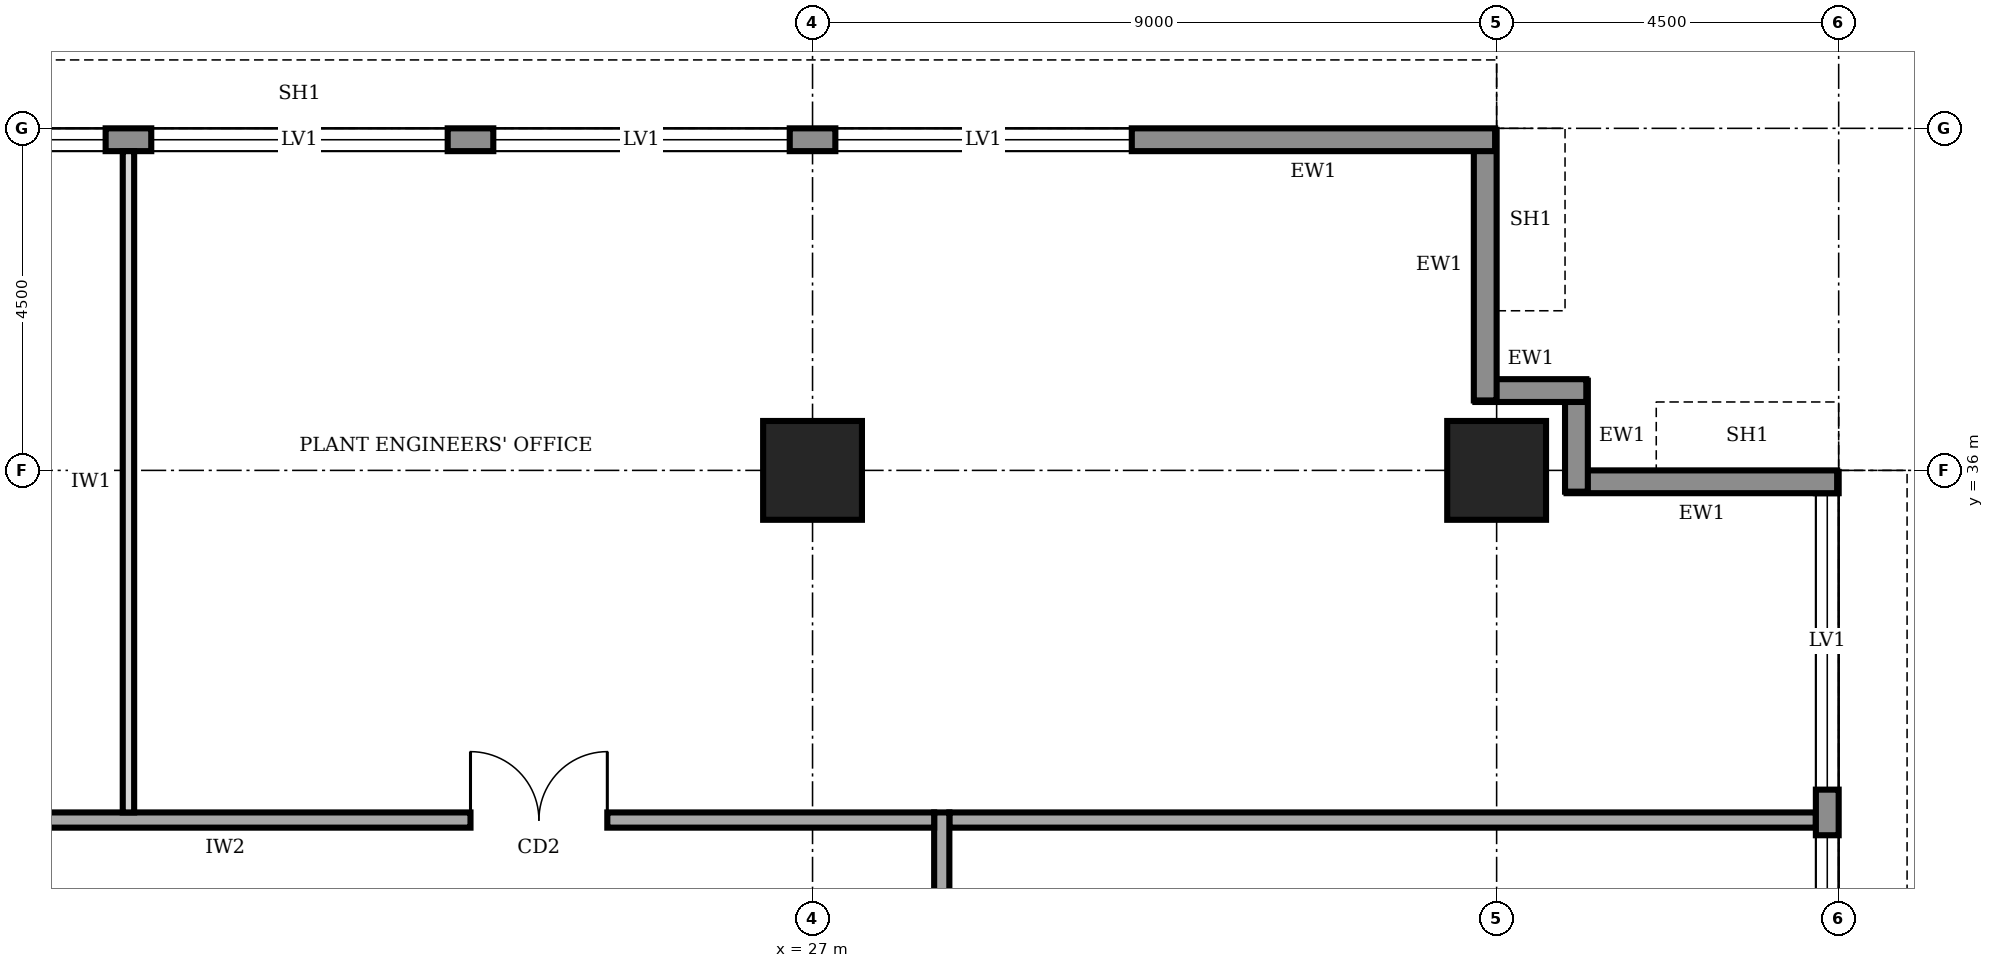
"""IFC4 building model, lengths in metres.
Left out: names, types, materials, properties, quantities, classifications, styles, units other than length and angle.
Written with IfcOpenShell. Run it as: python <this file> out.ifc"""

import sys

from ifc_helpers import new_model, si_unit, direction, frame, frame_2d, origin, origin_2d, place, context, subcontext, project, spatial, rectangle, extrude, element, fill, save


model = new_model("IFC4")
c1 = context("Model", 3, precision=1e-05, world=origin(), true_north=direction((0.0, 1.0)))
c2 = subcontext(c1, "Body", "Model", "MODEL_VIEW")
j1 = project(units=[si_unit("LENGTHUNIT", "METRE"), si_unit("PLANEANGLEUNIT", "RADIAN")], contexts=[c1])
p1 = place(None, origin())
s1 = spatial("IfcSite", under=j1, at=p1, CompositionType="ELEMENT")
p2 = place(p1, origin())
s2 = spatial("IfcBuilding", under=s1, at=p2, CompositionType="ELEMENT")
p3 = place(p2, frame((0.0, 0.0, 289.0)))
s3 = spatial("IfcBuildingStorey", under=s2, at=p3, CompositionType="ELEMENT", Elevation=289.0)
for number, where, z_axis, x_axis in (
    (1, (27.0, 36.0, 0.0), (0.0, 0.0, 1.0), (1.0, 0.0, 0.0)),
    (2, (36.0, 36.0, 0.0), (0.0, 0.0, 1.0), (1.0, 0.0, 0.0)),
):
    element("IfcColumn", number, at=place(p3, frame(where, z_axis=z_axis, x_axis=x_axis)), inside=s3, PredefinedType="COLUMN", context=c2, shape_type="SweptSolid", body=[
        extrude(rectangle(XDim=1.3, YDim=1.3, at=origin_2d()), origin(), (0.0, 0.0, 1.0), 4.0),
    ])
p4 = place(p3, frame((40.35, 4.52, 0.0), z_axis=(0.0, 0.0, 1.0), x_axis=(0.0, 1.0, 0.0)))
e3 = element("IfcWall", 3, at=p4, inside=s3, PredefinedType="STANDARD", context=c2, shape_type="SweptSolid", body=[
    extrude(rectangle(XDim=31.46, YDim=0.3, at=frame_2d((15.73, 0.0))), origin(), (0.0, 0.0, 1.0), 3.75),
])
p5 = place(p4, frame((4.78, 0.0, 0.9)))
e4 = element("IfcOpeningElement", 4, at=p5, cuts=e3, PredefinedType="OPENING", context=c2, shape_type="SweptSolid", body=[
    extrude(rectangle(XDim=3.9, YDim=2.2, at=frame_2d((1.95, 1.1))), frame((0.0, 0.16, 0.0), z_axis=(0.0, -1.0, 0.0), x_axis=(1.0, 0.0, 0.0)), (0.0, 0.0, 1.0), 0.32),
])
p6 = place(p4, frame((9.28, 0.0, 0.9)))
e5 = element("IfcOpeningElement", 5, at=p6, cuts=e3, PredefinedType="OPENING", context=c2, shape_type="SweptSolid", body=[
    extrude(rectangle(XDim=3.9, YDim=2.2, at=frame_2d((1.95, 1.1))), frame((0.0, 0.16, 0.0), z_axis=(0.0, -1.0, 0.0), x_axis=(1.0, 0.0, 0.0)), (0.0, 0.0, 1.0), 0.32),
])
p7 = place(p4, frame((13.78, 0.0, 0.9)))
e6 = element("IfcOpeningElement", 6, at=p7, cuts=e3, PredefinedType="OPENING", context=c2, shape_type="SweptSolid", body=[
    extrude(rectangle(XDim=3.9, YDim=2.2, at=frame_2d((1.95, 1.1))), frame((0.0, 0.16, 0.0), z_axis=(0.0, -1.0, 0.0), x_axis=(1.0, 0.0, 0.0)), (0.0, 0.0, 1.0), 0.32),
])
p8 = place(p4, frame((18.28, 0.0, 0.9)))
e7 = element("IfcOpeningElement", 7, at=p8, cuts=e3, PredefinedType="OPENING", context=c2, shape_type="SweptSolid", body=[
    extrude(rectangle(XDim=3.9, YDim=2.2, at=frame_2d((1.95, 1.1))), frame((0.0, 0.16, 0.0), z_axis=(0.0, -1.0, 0.0), x_axis=(1.0, 0.0, 0.0)), (0.0, 0.0, 1.0), 0.32),
])
p9 = place(p4, frame((22.78, 0.0, 0.9)))
e8 = element("IfcOpeningElement", 8, at=p9, cuts=e3, PredefinedType="OPENING", context=c2, shape_type="SweptSolid", body=[
    extrude(rectangle(XDim=3.9, YDim=2.2, at=frame_2d((1.95, 1.1))), frame((0.0, 0.16, 0.0), z_axis=(0.0, -1.0, 0.0), x_axis=(1.0, 0.0, 0.0)), (0.0, 0.0, 1.0), 0.32),
])
p10 = place(p4, frame((27.28, 0.0, 0.9)))
e9 = element("IfcOpeningElement", 9, at=p10, cuts=e3, PredefinedType="OPENING", context=c2, shape_type="SweptSolid", body=[
    extrude(rectangle(XDim=3.9, YDim=2.2, at=frame_2d((1.95, 1.1))), frame((0.0, 0.16, 0.0), z_axis=(0.0, -1.0, 0.0), x_axis=(1.0, 0.0, 0.0)), (0.0, 0.0, 1.0), 0.32),
])
p11 = place(p3, frame((40.48, 35.85, 0.0), z_axis=(0.0, 0.0, 1.0), x_axis=(-1.0, 0.0, 0.0)))
e10 = element("IfcWall", 10, at=p11, inside=s3, PredefinedType="STANDARD", context=c2, shape_type="SweptSolid", body=[
    extrude(rectangle(XDim=3.56, YDim=0.3, at=frame_2d((1.78, 0.0))), origin(), (0.0, 0.0, 1.0), 2.85),
])
for number, where, z_axis, x_axis in (
    (11, (37.05, 35.72, 0.0), (0.0, 0.0, 1.0), (0.0, 1.0, 0.0)),
    (12, (37.18, 37.05, 0.0), (0.0, 0.0, 1.0), (-1.0, 0.0, 0.0)),
):
    element("IfcWall", number, at=place(p3, frame(where, z_axis=z_axis, x_axis=x_axis)), inside=s3, PredefinedType="STANDARD", context=c2, shape_type="SweptSolid", body=[
        extrude(rectangle(XDim=1.46, YDim=0.3, at=frame_2d((0.73, 0.0))), origin(), (0.0, 0.0, 1.0), 3.75),
    ])
p12 = place(p3, frame((35.85, 36.92, 0.0), z_axis=(0.0, 0.0, 1.0), x_axis=(0.0, 1.0, 0.0)))
e13 = element("IfcWall", 13, at=p12, inside=s3, PredefinedType="STANDARD", context=c2, shape_type="SweptSolid", body=[
    extrude(rectangle(XDim=3.56, YDim=0.3, at=frame_2d((1.78, 0.0))), origin(), (0.0, 0.0, 1.0), 2.85),
])
p13 = place(p3, frame((35.98, 40.35, 0.0), z_axis=(0.0, 0.0, 1.0), x_axis=(-1.0, 0.0, 0.0)))
e14 = element("IfcWall", 14, at=p13, inside=s3, PredefinedType="STANDARD", context=c2, shape_type="SweptSolid", body=[
    extrude(rectangle(XDim=31.46, YDim=0.3, at=frame_2d((15.73, 0.0))), origin(), (0.0, 0.0, 1.0), 3.75),
])
p14 = place(p13, frame((27.28, 0.0, 0.9)))
e15 = element("IfcOpeningElement", 15, at=p14, cuts=e14, PredefinedType="OPENING", context=c2, shape_type="SweptSolid", body=[
    extrude(rectangle(XDim=3.9, YDim=2.2, at=frame_2d((1.95, 1.1))), frame((0.0, 0.16, 0.0), z_axis=(0.0, -1.0, 0.0), x_axis=(1.0, 0.0, 0.0)), (0.0, 0.0, 1.0), 0.32),
])
p15 = place(p13, frame((22.78, 0.0, 0.9)))
e16 = element("IfcOpeningElement", 16, at=p15, cuts=e14, PredefinedType="OPENING", context=c2, shape_type="SweptSolid", body=[
    extrude(rectangle(XDim=3.9, YDim=2.2, at=frame_2d((1.95, 1.1))), frame((0.0, 0.16, 0.0), z_axis=(0.0, -1.0, 0.0), x_axis=(1.0, 0.0, 0.0)), (0.0, 0.0, 1.0), 0.32),
])
p16 = place(p13, frame((18.28, 0.0, 0.9)))
e17 = element("IfcOpeningElement", 17, at=p16, cuts=e14, PredefinedType="OPENING", context=c2, shape_type="SweptSolid", body=[
    extrude(rectangle(XDim=3.9, YDim=2.2, at=frame_2d((1.95, 1.1))), frame((0.0, 0.16, 0.0), z_axis=(0.0, -1.0, 0.0), x_axis=(1.0, 0.0, 0.0)), (0.0, 0.0, 1.0), 0.32),
])
p17 = place(p13, frame((13.78, 0.0, 0.9)))
e18 = element("IfcOpeningElement", 18, at=p17, cuts=e14, PredefinedType="OPENING", context=c2, shape_type="SweptSolid", body=[
    extrude(rectangle(XDim=3.9, YDim=2.2, at=frame_2d((1.95, 1.1))), frame((0.0, 0.16, 0.0), z_axis=(0.0, -1.0, 0.0), x_axis=(1.0, 0.0, 0.0)), (0.0, 0.0, 1.0), 0.32),
])
p18 = place(p13, frame((9.28, 0.0, 0.9)))
e19 = element("IfcOpeningElement", 19, at=p18, cuts=e14, PredefinedType="OPENING", context=c2, shape_type="SweptSolid", body=[
    extrude(rectangle(XDim=3.9, YDim=2.2, at=frame_2d((1.95, 1.1))), frame((0.0, 0.16, 0.0), z_axis=(0.0, -1.0, 0.0), x_axis=(1.0, 0.0, 0.0)), (0.0, 0.0, 1.0), 0.32),
])
p19 = place(p13, frame((4.78, 0.0, 0.9)))
e20 = element("IfcOpeningElement", 20, at=p19, cuts=e14, PredefinedType="OPENING", context=c2, shape_type="SweptSolid", body=[
    extrude(rectangle(XDim=3.9, YDim=2.2, at=frame_2d((1.95, 1.1))), frame((0.0, 0.16, 0.0), z_axis=(0.0, -1.0, 0.0), x_axis=(1.0, 0.0, 0.0)), (0.0, 0.0, 1.0), 0.32),
])
p20 = place(p3, frame((28.7, 9.2, 0.0), z_axis=(0.0, 0.0, 1.0), x_axis=(0.0, 1.0, 0.0)))
e21 = element("IfcWall", 21, at=p20, inside=s3, PredefinedType="SOLIDWALL", context=c2, shape_type="SweptSolid", body=[
    extrude(rectangle(XDim=22.3, YDim=0.2, at=frame_2d((11.15, 0.0))), origin(), (0.0, 0.0, 1.0), 3.75),
])
p21 = place(p20, frame((10.05, 0.0, 0.0)))
e22 = element("IfcOpeningElement", 22, at=p21, cuts=e21, PredefinedType="OPENING", context=c2, shape_type="SweptSolid", body=[
    extrude(rectangle(XDim=2.0, YDim=2.1, at=frame_2d((1.0, 1.05))), frame((0.0, 0.11, 0.0), z_axis=(0.0, -1.0, 0.0), x_axis=(1.0, 0.0, 0.0)), (0.0, 0.0, 1.0), 0.22),
])
p22 = place(p3, frame((28.6, 31.4, 0.0), z_axis=(0.0, 0.0, 1.0), x_axis=(-1.0, 0.0, 0.0)))
e23 = element("IfcWall", 23, at=p22, inside=s3, PredefinedType="SOLIDWALL", context=c2, shape_type="SweptSolid", body=[
    extrude(rectangle(XDim=16.9, YDim=0.2, at=frame_2d((8.45, 0.0))), origin(), (0.0, 0.0, 1.0), 3.75),
])
p23 = place(p22, frame((12.55, 0.0, 0.0)))
e24 = element("IfcOpeningElement", 24, at=p23, cuts=e23, PredefinedType="OPENING", context=c2, shape_type="SweptSolid", body=[
    extrude(rectangle(XDim=2.4, YDim=2.7, at=frame_2d((1.2, 1.35))), frame((0.0, 0.11, 0.0), z_axis=(0.0, -1.0, 0.0), x_axis=(1.0, 0.0, 0.0)), (0.0, 0.0, 1.0), 0.22),
])
p24 = place(p22, frame((4.3, 0.0, 0.0)))
e25 = element("IfcOpeningElement", 25, at=p24, cuts=e23, PredefinedType="OPENING", context=c2, shape_type="SweptSolid", body=[
    extrude(rectangle(XDim=1.8, YDim=2.1, at=frame_2d((0.9, 1.05))), frame((0.0, 0.11, 0.0), z_axis=(0.0, -1.0, 0.0), x_axis=(1.0, 0.0, 0.0)), (0.0, 0.0, 1.0), 0.22),
])
p25 = place(p3, frame((28.8, 31.4, 0.0), z_axis=(0.0, 0.0, 1.0), x_axis=(1.0, 0.0, 0.0)))
e26 = element("IfcWall", 26, at=p25, inside=s3, PredefinedType="SOLIDWALL", context=c2, shape_type="SweptSolid", body=[
    extrude(rectangle(XDim=11.4, YDim=0.2, at=frame_2d((5.7, 0.0))), origin(), (0.0, 0.0, 1.0), 3.75),
])
p26 = place(p3, frame((18.0, 31.5, 0.0), z_axis=(0.0, 0.0, 1.0), x_axis=(0.0, 1.0, 0.0)))
e27 = element("IfcWall", 27, at=p26, inside=s3, PredefinedType="PARTITIONING", context=c2, shape_type="SweptSolid", body=[
    extrude(rectangle(XDim=8.7, YDim=0.15, at=frame_2d((4.35, 0.0))), origin(), (0.0, 0.0, 1.0), 3.75),
])
p27 = place(p9, origin())
e28 = element("IfcWindow", 28, at=p27, inside=s3, PartitioningType="SINGLE_PANEL", PredefinedType="WINDOW", context=c2, shape_type="SweptSolid", body=[
    extrude(rectangle(XDim=3.9, YDim=2.2, at=frame_2d((1.95, 1.1))), frame((0.0, 0.03, 0.0), z_axis=(0.0, -1.0, 0.0), x_axis=(1.0, 0.0, 0.0)), (0.0, 0.0, 1.0), 0.06),
])
fill(e8, e28)
p28 = place(p10, origin())
e29 = element("IfcWindow", 29, at=p28, inside=s3, PartitioningType="SINGLE_PANEL", PredefinedType="WINDOW", context=c2, shape_type="SweptSolid", body=[
    extrude(rectangle(XDim=3.9, YDim=2.2, at=frame_2d((1.95, 1.1))), frame((0.0, 0.03, 0.0), z_axis=(0.0, -1.0, 0.0), x_axis=(1.0, 0.0, 0.0)), (0.0, 0.0, 1.0), 0.06),
])
fill(e9, e29)
p29 = place(p16, origin())
e30 = element("IfcWindow", 30, at=p29, inside=s3, PartitioningType="SINGLE_PANEL", PredefinedType="WINDOW", context=c2, shape_type="SweptSolid", body=[
    extrude(rectangle(XDim=3.9, YDim=2.2, at=frame_2d((1.95, 1.1))), frame((0.0, 0.03, 0.0), z_axis=(0.0, -1.0, 0.0), x_axis=(1.0, 0.0, 0.0)), (0.0, 0.0, 1.0), 0.06),
])
fill(e17, e30)
p30 = place(p17, origin())
e31 = element("IfcWindow", 31, at=p30, inside=s3, PartitioningType="SINGLE_PANEL", PredefinedType="WINDOW", context=c2, shape_type="SweptSolid", body=[
    extrude(rectangle(XDim=3.9, YDim=2.2, at=frame_2d((1.95, 1.1))), frame((0.0, 0.03, 0.0), z_axis=(0.0, -1.0, 0.0), x_axis=(1.0, 0.0, 0.0)), (0.0, 0.0, 1.0), 0.06),
])
fill(e18, e31)
p31 = place(p18, origin())
e32 = element("IfcWindow", 32, at=p31, inside=s3, PartitioningType="SINGLE_PANEL", PredefinedType="WINDOW", context=c2, shape_type="SweptSolid", body=[
    extrude(rectangle(XDim=3.9, YDim=2.2, at=frame_2d((1.95, 1.1))), frame((0.0, 0.03, 0.0), z_axis=(0.0, -1.0, 0.0), x_axis=(1.0, 0.0, 0.0)), (0.0, 0.0, 1.0), 0.06),
])
fill(e19, e32)
p32 = place(p19, origin())
e33 = element("IfcWindow", 33, at=p32, inside=s3, PartitioningType="SINGLE_PANEL", PredefinedType="WINDOW", context=c2, shape_type="SweptSolid", body=[
    extrude(rectangle(XDim=3.9, YDim=2.2, at=frame_2d((1.95, 1.1))), frame((0.0, 0.03, 0.0), z_axis=(0.0, -1.0, 0.0), x_axis=(1.0, 0.0, 0.0)), (0.0, 0.0, 1.0), 0.06),
])
fill(e20, e33)
p33 = place(p24, frame((1.8, 0.0, 0.0), z_axis=(0.0, 0.0, 1.0), x_axis=(-1.0, 0.0, 0.0)))
e34 = element("IfcDoor", 34, at=p33, inside=s3, OperationType="DOUBLE_DOOR_SINGLE_SWING", PredefinedType="DOOR", context=c2, shape_type="SweptSolid", body=[
    extrude(rectangle(XDim=1.8, YDim=2.1, at=frame_2d((0.9, 1.05))), frame((0.0, 0.025, 0.0), z_axis=(0.0, -1.0, 0.0), x_axis=(1.0, 0.0, 0.0)), (0.0, 0.0, 1.0), 0.05),
])
fill(e25, e34)
save(model, sys.argv[1])
